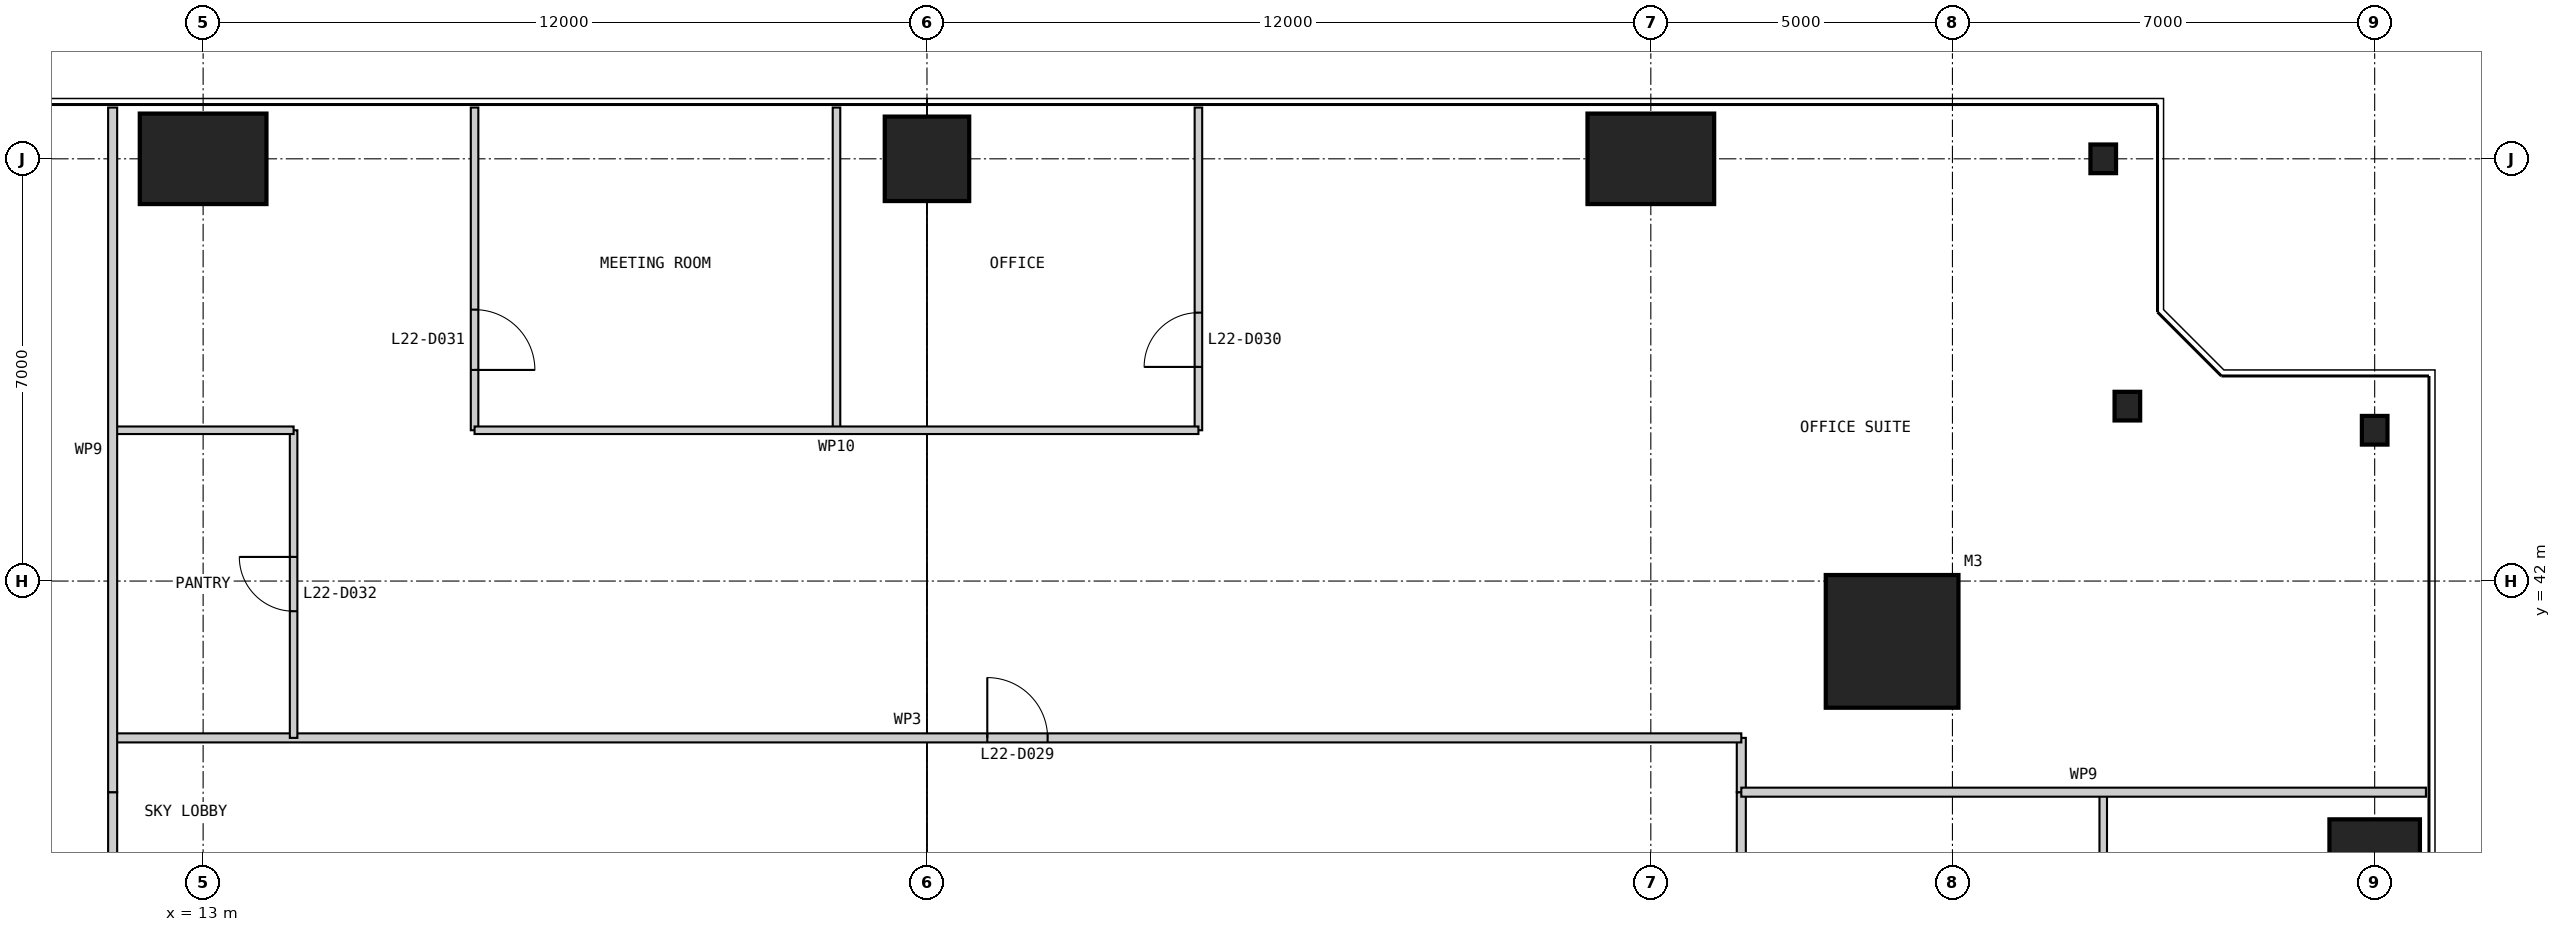
"""IFC4 building model, lengths in metres.
Left out: names, types, materials, properties, quantities, classifications, styles, units other than length and angle.
Written with IfcOpenShell. Run it as: python <this file> out.ifc"""

import sys

from ifc_helpers import new_model, si_unit, direction, frame, frame_2d, origin, origin_2d, place, context, subcontext, project, spatial, rectangle, i_section, extrude, element, fill, save


model = new_model("IFC4")
c1 = context("Model", 3, precision=1e-05, world=origin(), true_north=direction((0.0, 1.0)))
c2 = subcontext(c1, "Body", "Model", "MODEL_VIEW")
j1 = project(units=[si_unit("LENGTHUNIT", "METRE"), si_unit("PLANEANGLEUNIT", "RADIAN")], contexts=[c1])
p1 = place(None, origin())
s1 = spatial("IfcSite", under=j1, at=p1, CompositionType="ELEMENT")
p2 = place(p1, origin())
s2 = spatial("IfcBuilding", under=s1, at=p2, CompositionType="ELEMENT")
p3 = place(p2, frame((0.0, 0.0, 97.0)))
s3 = spatial("IfcBuildingStorey", under=s2, at=p3, CompositionType="ELEMENT", Elevation=97.0)
p4 = place(p3, frame((41.0, 41.0, 0.0), z_axis=(0.0, 0.0, 1.0), x_axis=(1.0, 0.0, 0.0)))
e1 = element("IfcColumn", 1, at=p4, inside=s3, PredefinedType="COLUMN", context=c2, shape_type="SweptSolid", body=[
    extrude(rectangle(XDim=2.2, YDim=2.2, at=origin_2d()), origin(), (0.0, 0.0, 1.0), 5.4),
])
p5 = place(p3, frame((49.0, 37.0, 0.0), z_axis=(0.0, 0.0, 1.0), x_axis=(1.0, 0.0, 0.0)))
e2 = element("IfcColumn", 2, at=p5, inside=s3, PredefinedType="COLUMN", context=c2, shape_type="SweptSolid", body=[
    extrude(rectangle(XDim=1.5, YDim=2.1, at=origin_2d()), origin(), (0.0, 0.0, 1.0), 5.4),
])
for number, where, z_axis, x_axis in (
    (3, (49.0, 44.5, 0.0), (0.0, 0.0, 1.0), (1.0, 0.0, 0.0)),
    (4, (44.9, 44.9, 0.0), (0.0, 0.0, 1.0), (1.0, 0.0, 0.0)),
    (5, (44.5, 49.0, 0.0), (0.0, 0.0, 1.0), (1.0, 0.0, 0.0)),
):
    element("IfcColumn", number, at=place(p3, frame(where, z_axis=z_axis, x_axis=x_axis)), inside=s3, PredefinedType="COLUMN", context=c2, shape_type="SweptSolid", body=[
        extrude(i_section(OverallWidth=0.424, OverallDepth=0.475, WebThickness=0.048, FlangeThickness=0.077, at=origin_2d()), origin(), (0.0, 0.0, 1.0), 5.4),
    ])
p6 = place(p3, frame((37.0, 49.0, 0.0), z_axis=(0.0, 0.0, 1.0), x_axis=(1.0, 0.0, 0.0)))
e6 = element("IfcColumn", 6, at=p6, inside=s3, PredefinedType="COLUMN", context=c2, shape_type="SweptSolid", body=[
    extrude(rectangle(XDim=2.1, YDim=1.5, at=origin_2d()), origin(), (0.0, 0.0, 1.0), 5.4),
])
p7 = place(p3, frame((25.0, 49.0, 0.0), z_axis=(0.0, 0.0, 1.0), x_axis=(1.0, 0.0, 0.0)))
e7 = element("IfcColumn", 7, at=p7, inside=s3, PredefinedType="COLUMN", context=c2, shape_type="SweptSolid", body=[
    extrude(rectangle(XDim=1.4, YDim=1.4, at=origin_2d()), origin(), (0.0, 0.0, 1.0), 5.4),
])
p8 = place(p3, frame((13.0, 49.0, 0.0), z_axis=(0.0, 0.0, 1.0), x_axis=(1.0, 0.0, 0.0)))
e8 = element("IfcColumn", 8, at=p8, inside=s3, PredefinedType="COLUMN", context=c2, shape_type="SweptSolid", body=[
    extrude(rectangle(XDim=2.1, YDim=1.5, at=origin_2d()), origin(), (0.0, 0.0, 1.0), 5.4),
])
p9 = place(p3, frame((38.5, 11.5, 0.0), z_axis=(0.0, 0.0, 1.0), x_axis=(0.0, 1.0, 0.0)))
e9 = element("IfcWall", 9, at=p9, inside=s3, PredefinedType="PARTITIONING", context=c2, shape_type="SweptSolid", body=[
    extrude(rectangle(XDim=27.0, YDim=0.15, at=frame_2d((13.5, 0.0))), origin(), (0.0, 0.0, 1.0), 5.25),
])
p10 = place(p9, frame((3.25, 0.0, 0.0)))
e10 = element("IfcOpeningElement", 10, at=p10, cuts=e9, PredefinedType="OPENING", context=c2, shape_type="SweptSolid", body=[
    extrude(rectangle(XDim=1.0, YDim=2.2, at=frame_2d((0.5, 1.1))), frame((0.0, 0.085, 0.0), z_axis=(0.0, -1.0, 0.0), x_axis=(1.0, 0.0, 0.0)), (0.0, 0.0, 1.0), 0.17),
])
p11 = place(p9, frame((7.0, 0.0, 0.0)))
e11 = element("IfcOpeningElement", 11, at=p11, cuts=e9, PredefinedType="OPENING", context=c2, shape_type="SweptSolid", body=[
    extrude(rectangle(XDim=1.0, YDim=2.2, at=frame_2d((0.5, 1.1))), frame((0.0, 0.085, 0.0), z_axis=(0.0, -1.0, 0.0), x_axis=(1.0, 0.0, 0.0)), (0.0, 0.0, 1.0), 0.17),
])
p12 = place(p9, frame((14.5, 0.0, 0.0)))
e12 = element("IfcOpeningElement", 12, at=p12, cuts=e9, PredefinedType="OPENING", context=c2, shape_type="SweptSolid", body=[
    extrude(rectangle(XDim=1.0, YDim=2.2, at=frame_2d((0.5, 1.1))), frame((0.0, 0.085, 0.0), z_axis=(0.0, -1.0, 0.0), x_axis=(1.0, 0.0, 0.0)), (0.0, 0.0, 1.0), 0.17),
])
p13 = place(p3, frame((44.5, 32.5, 0.0), z_axis=(0.0, 0.0, 1.0), x_axis=(0.0, 1.0, 0.0)))
e13 = element("IfcWall", 13, at=p13, inside=s3, PredefinedType="PARTITIONING", context=c2, shape_type="SweptSolid", body=[
    extrude(rectangle(XDim=6.0, YDim=0.125, at=frame_2d((3.0, 0.0))), origin(), (0.0, 0.0, 1.0), 5.25),
])
p14 = place(p13, frame((4.05, 0.0, 0.0)))
e14 = element("IfcOpeningElement", 14, at=p14, cuts=e13, PredefinedType="OPENING", context=c2, shape_type="SweptSolid", body=[
    extrude(rectangle(XDim=0.9, YDim=2.2, at=frame_2d((0.45, 1.1))), frame((0.0, 0.073, 0.0), z_axis=(0.0, -1.0, 0.0), x_axis=(1.0, 0.0, 0.0)), (0.0, 0.0, 1.0), 0.145),
])
p15 = place(p3, frame((38.5, 38.5, 0.0), z_axis=(0.0, 0.0, 1.0), x_axis=(0.0, 1.0, 0.0)))
e15 = element("IfcWall", 15, at=p15, inside=s3, PredefinedType="PARTITIONING", context=c2, shape_type="SweptSolid", body=[
    extrude(rectangle(XDim=0.9, YDim=0.15, at=frame_2d((0.45, 0.0))), origin(), (0.0, 0.0, 1.0), 5.25),
])
p16 = place(p3, frame((38.5, 39.4, 0.0), z_axis=(0.0, 0.0, 1.0), x_axis=(-1.0, 0.0, 0.0)))
e16 = element("IfcWall", 16, at=p16, inside=s3, PredefinedType="PARTITIONING", context=c2, shape_type="SweptSolid", body=[
    extrude(rectangle(XDim=27.0, YDim=0.15, at=frame_2d((13.5, 0.0))), origin(), (0.0, 0.0, 1.0), 5.25),
])
p17 = place(p16, frame((11.5, 0.0, 0.0)))
e17 = element("IfcOpeningElement", 17, at=p17, cuts=e16, PredefinedType="OPENING", context=c2, shape_type="SweptSolid", body=[
    extrude(rectangle(XDim=1.0, YDim=2.2, at=frame_2d((0.5, 1.1))), frame((0.0, 0.085, 0.0), z_axis=(0.0, -1.0, 0.0), x_axis=(1.0, 0.0, 0.0)), (0.0, 0.0, 1.0), 0.17),
])
p18 = place(p3, frame((49.85, 38.5, 0.0), z_axis=(0.0, 0.0, 1.0), x_axis=(-1.0, 0.0, 0.0)))
e18 = element("IfcWall", 18, at=p18, inside=s3, PredefinedType="PARTITIONING", context=c2, shape_type="SweptSolid", body=[
    extrude(rectangle(XDim=11.35, YDim=0.15, at=frame_2d((5.675, 0.0))), origin(), (0.0, 0.0, 1.0), 5.25),
])
p19 = place(p3, frame((29.5, 49.85, 0.0), z_axis=(0.0, 0.0, 1.0), x_axis=(0.0, -1.0, 0.0)))
e19 = element("IfcWall", 19, at=p19, inside=s3, PredefinedType="PARTITIONING", context=c2, shape_type="SweptSolid", body=[
    extrude(rectangle(XDim=5.35, YDim=0.125, at=frame_2d((2.675, 0.0))), origin(), (0.0, 0.0, 1.0), 5.25),
])
p20 = place(p19, frame((3.4, 0.0, 0.0)))
e20 = element("IfcOpeningElement", 20, at=p20, cuts=e19, PredefinedType="OPENING", context=c2, shape_type="SweptSolid", body=[
    extrude(rectangle(XDim=0.9, YDim=2.2, at=frame_2d((0.45, 1.1))), frame((0.0, 0.073, 0.0), z_axis=(0.0, -1.0, 0.0), x_axis=(1.0, 0.0, 0.0)), (0.0, 0.0, 1.0), 0.145),
])
p21 = place(p3, frame((23.5, 49.85, 0.0), z_axis=(0.0, 0.0, 1.0), x_axis=(0.0, -1.0, 0.0)))
e21 = element("IfcWall", 21, at=p21, inside=s3, PredefinedType="PARTITIONING", context=c2, shape_type="SweptSolid", body=[
    extrude(rectangle(XDim=5.35, YDim=0.125, at=frame_2d((2.675, 0.0))), origin(), (0.0, 0.0, 1.0), 5.25),
])
p22 = place(p3, frame((17.5, 49.85, 0.0), z_axis=(0.0, 0.0, 1.0), x_axis=(0.0, -1.0, 0.0)))
e22 = element("IfcWall", 22, at=p22, inside=s3, PredefinedType="PARTITIONING", context=c2, shape_type="SweptSolid", body=[
    extrude(rectangle(XDim=5.35, YDim=0.125, at=frame_2d((2.675, 0.0))), origin(), (0.0, 0.0, 1.0), 5.25),
])
p23 = place(p22, frame((3.35, 0.0, 0.0)))
e23 = element("IfcOpeningElement", 23, at=p23, cuts=e22, PredefinedType="OPENING", context=c2, shape_type="SweptSolid", body=[
    extrude(rectangle(XDim=1.0, YDim=2.2, at=frame_2d((0.5, 1.1))), frame((0.0, 0.073, 0.0), z_axis=(0.0, -1.0, 0.0), x_axis=(1.0, 0.0, 0.0)), (0.0, 0.0, 1.0), 0.145),
])
p24 = place(p3, frame((14.5, 44.5, 0.0), z_axis=(0.0, 0.0, 1.0), x_axis=(0.0, -1.0, 0.0)))
e24 = element("IfcWall", 24, at=p24, inside=s3, PredefinedType="PARTITIONING", context=c2, shape_type="SweptSolid", body=[
    extrude(rectangle(XDim=5.1, YDim=0.125, at=frame_2d((2.55, 0.0))), origin(), (0.0, 0.0, 1.0), 5.25),
])
p25 = place(p24, frame((2.1, 0.0, 0.0)))
e25 = element("IfcOpeningElement", 25, at=p25, cuts=e24, PredefinedType="OPENING", context=c2, shape_type="SweptSolid", body=[
    extrude(rectangle(XDim=0.9, YDim=2.2, at=frame_2d((0.45, 1.1))), frame((0.0, 0.073, 0.0), z_axis=(0.0, -1.0, 0.0), x_axis=(1.0, 0.0, 0.0)), (0.0, 0.0, 1.0), 0.145),
])
p26 = place(p3, frame((29.5, 44.5, 0.0), z_axis=(0.0, 0.0, 1.0), x_axis=(-1.0, 0.0, 0.0)))
e26 = element("IfcWall", 26, at=p26, inside=s3, PredefinedType="PARTITIONING", context=c2, shape_type="SweptSolid", body=[
    extrude(rectangle(XDim=12.0, YDim=0.125, at=frame_2d((6.0, 0.0))), origin(), (0.0, 0.0, 1.0), 5.25),
])
p27 = place(p3, frame((14.5, 44.5, 0.0), z_axis=(0.0, 0.0, 1.0), x_axis=(-1.0, 0.0, 0.0)))
e27 = element("IfcWall", 27, at=p27, inside=s3, PredefinedType="PARTITIONING", context=c2, shape_type="SweptSolid", body=[
    extrude(rectangle(XDim=3.0, YDim=0.125, at=frame_2d((1.5, 0.0))), origin(), (0.0, 0.0, 1.0), 5.25),
])
p28 = place(p3, frame((11.5, 38.5, 0.0), z_axis=(0.0, 0.0, 1.0), x_axis=(0.0, -1.0, 0.0)))
e28 = element("IfcWall", 28, at=p28, inside=s3, PredefinedType="PARTITIONING", context=c2, shape_type="SweptSolid", body=[
    extrude(rectangle(XDim=27.0, YDim=0.15, at=frame_2d((13.5, 0.0))), origin(), (0.0, 0.0, 1.0), 5.25),
])
p29 = place(p28, frame((2.5, 0.0, 0.0)))
e29 = element("IfcOpeningElement", 29, at=p29, cuts=e28, PredefinedType="OPENING", context=c2, shape_type="SweptSolid", body=[
    extrude(rectangle(XDim=1.0, YDim=2.2, at=frame_2d((0.5, 1.1))), frame((0.0, 0.085, 0.0), z_axis=(0.0, -1.0, 0.0), x_axis=(1.0, 0.0, 0.0)), (0.0, 0.0, 1.0), 0.17),
])
p30 = place(p28, frame((7.0, 0.0, 0.0)))
e30 = element("IfcOpeningElement", 30, at=p30, cuts=e28, PredefinedType="OPENING", context=c2, shape_type="SweptSolid", body=[
    extrude(rectangle(XDim=1.0, YDim=2.2, at=frame_2d((0.5, 1.1))), frame((0.0, 0.085, 0.0), z_axis=(0.0, -1.0, 0.0), x_axis=(1.0, 0.0, 0.0)), (0.0, 0.0, 1.0), 0.17),
])
p31 = place(p28, frame((14.5, 0.0, 0.0)))
e31 = element("IfcOpeningElement", 31, at=p31, cuts=e28, PredefinedType="OPENING", context=c2, shape_type="SweptSolid", body=[
    extrude(rectangle(XDim=1.0, YDim=2.2, at=frame_2d((0.5, 1.1))), frame((0.0, 0.085, 0.0), z_axis=(0.0, -1.0, 0.0), x_axis=(1.0, 0.0, 0.0)), (0.0, 0.0, 1.0), 0.17),
])
p32 = place(p3, frame((11.5, 49.85, 0.0), z_axis=(0.0, 0.0, 1.0), x_axis=(0.0, -1.0, 0.0)))
e32 = element("IfcWall", 32, at=p32, inside=s3, PredefinedType="PARTITIONING", context=c2, shape_type="SweptSolid", body=[
    extrude(rectangle(XDim=11.35, YDim=0.15, at=frame_2d((5.675, 0.0))), origin(), (0.0, 0.0, 1.0), 5.25),
])
p33 = place(p17, frame((1.0, 0.0, 0.0), z_axis=(0.0, 0.0, 1.0), x_axis=(-1.0, 0.0, 0.0)))
e33 = element("IfcDoor", 33, at=p33, inside=s3, OperationType="SINGLE_SWING_LEFT", PredefinedType="DOOR", context=c2, shape_type="SweptSolid", body=[
    extrude(rectangle(XDim=1.0, YDim=2.2, at=frame_2d((0.5, 1.1))), frame((0.0, 0.025, 0.0), z_axis=(0.0, -1.0, 0.0), x_axis=(1.0, 0.0, 0.0)), (0.0, 0.0, 1.0), 0.05),
])
fill(e17, e33)
p34 = place(p20, frame((0.9, 0.0, 0.0), z_axis=(0.0, 0.0, 1.0), x_axis=(-1.0, 0.0, 0.0)))
e34 = element("IfcDoor", 34, at=p34, inside=s3, OperationType="SINGLE_SWING_LEFT", PredefinedType="DOOR", context=c2, shape_type="SweptSolid", body=[
    extrude(rectangle(XDim=0.9, YDim=2.2, at=frame_2d((0.45, 1.1))), frame((0.0, 0.025, 0.0), z_axis=(0.0, -1.0, 0.0), x_axis=(1.0, 0.0, 0.0)), (0.0, 0.0, 1.0), 0.05),
])
fill(e20, e34)
p35 = place(p23, origin())
e35 = element("IfcDoor", 35, at=p35, inside=s3, OperationType="SINGLE_SWING_RIGHT", PredefinedType="DOOR", context=c2, shape_type="SweptSolid", body=[
    extrude(rectangle(XDim=1.0, YDim=2.2, at=frame_2d((0.5, 1.1))), frame((0.0, 0.025, 0.0), z_axis=(0.0, -1.0, 0.0), x_axis=(1.0, 0.0, 0.0)), (0.0, 0.0, 1.0), 0.05),
])
fill(e23, e35)
p36 = place(p25, frame((0.9, 0.0, 0.0), z_axis=(0.0, 0.0, 1.0), x_axis=(-1.0, 0.0, 0.0)))
e36 = element("IfcDoor", 36, at=p36, inside=s3, OperationType="SINGLE_SWING_RIGHT", PredefinedType="DOOR", context=c2, shape_type="SweptSolid", body=[
    extrude(rectangle(XDim=0.9, YDim=2.2, at=frame_2d((0.45, 1.1))), frame((0.0, 0.025, 0.0), z_axis=(0.0, -1.0, 0.0), x_axis=(1.0, 0.0, 0.0)), (0.0, 0.0, 1.0), 0.05),
])
fill(e25, e36)
save(model, sys.argv[1])
